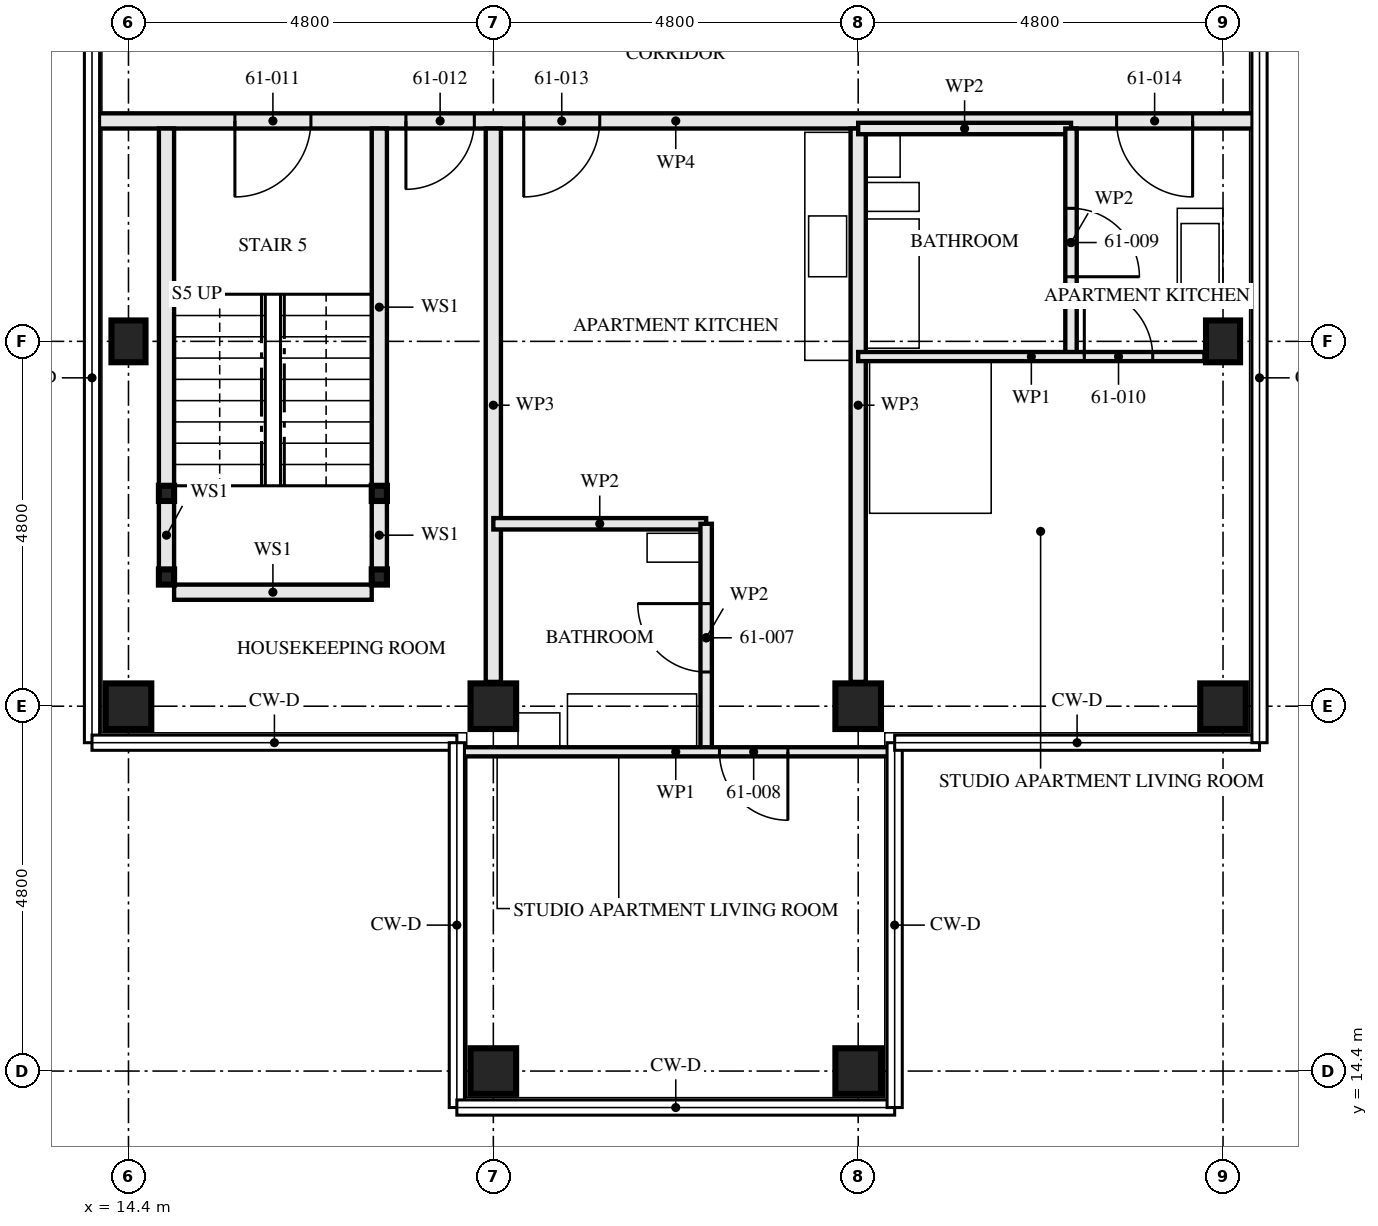
"""IFC4 building model, lengths in metres.
Left out: names, types, materials, properties, quantities, classifications, styles, units other than length and angle.
Written with IfcOpenShell. Run it as: python <this file> out.ifc"""

import sys

from ifc_helpers import new_model, si_unit, direction, frame, frame_2d, origin, origin_2d, place, context, subcontext, project, spatial, rectangle, hollow_rectangle, i_section, extrude, element, fill, save


model = new_model("IFC4")
c1 = context("Model", 3, precision=1e-05, world=origin(), true_north=direction((0.0, 1.0)))
c2 = subcontext(c1, "Body", "Model", "MODEL_VIEW")
j1 = project(units=[si_unit("LENGTHUNIT", "METRE"), si_unit("PLANEANGLEUNIT", "RADIAN")], contexts=[c1])
p1 = place(None, origin())
s1 = spatial("IfcSite", under=j1, at=p1, CompositionType="ELEMENT")
p2 = place(p1, origin())
s2 = spatial("IfcBuilding", under=s1, at=p2, CompositionType="ELEMENT")
p3 = place(p2, frame((0.0, 0.0, 222.5)))
s3 = spatial("IfcBuildingStorey", under=s2, at=p3, CompositionType="ELEMENT", Elevation=222.5)
p4 = place(p3, frame((14.4, 19.2, 0.0), z_axis=(0.0, 0.0, 1.0), x_axis=(0.0, 1.0, 0.0)))
e1 = element("IfcColumn", 1, at=p4, inside=s3, PredefinedType="COLUMN", context=c2, shape_type="SweptSolid", body=[
    extrude(hollow_rectangle(XDim=0.6, YDim=0.6, WallThickness=0.05, at=origin_2d()), origin(), (0.0, 0.0, 1.0), 3.5),
])
p5 = place(p3, frame((14.4, 24.0, 0.0), z_axis=(0.0, 0.0, 1.0), x_axis=(1.0, 0.0, 0.0)))
e2 = element("IfcColumn", 2, at=p5, inside=s3, PredefinedType="COLUMN", context=c2, shape_type="SweptSolid", body=[
    extrude(i_section(OverallWidth=0.448, OverallDepth=0.55, WebThickness=0.072, FlangeThickness=0.115, FilletRadius=0.015, at=origin_2d()), origin(), (0.0, 0.0, 1.0), 3.5),
])
for number, where, z_axis, x_axis in (
    (3, (19.2, 14.4, 0.0), (0.0, 0.0, 1.0), (0.0, 1.0, 0.0)),
    (4, (19.2, 19.2, 0.0), (0.0, 0.0, 1.0), (0.0, 1.0, 0.0)),
    (5, (24.0, 14.4, 0.0), (0.0, 0.0, 1.0), (0.0, 1.0, 0.0)),
    (6, (24.0, 19.2, 0.0), (0.0, 0.0, 1.0), (0.0, 1.0, 0.0)),
    (7, (28.8, 19.2, 0.0), (0.0, 0.0, 1.0), (0.0, 1.0, 0.0)),
):
    element("IfcColumn", number, at=place(p3, frame(where, z_axis=z_axis, x_axis=x_axis)), inside=s3, PredefinedType="COLUMN", context=c2, shape_type="SweptSolid", body=[
        extrude(hollow_rectangle(XDim=0.6, YDim=0.6, WallThickness=0.05, at=origin_2d()), origin(), (0.0, 0.0, 1.0), 3.5),
    ])
p6 = place(p3, frame((28.8, 24.0, 0.0), z_axis=(0.0, 0.0, 1.0), x_axis=(1.0, 0.0, 0.0)))
e8 = element("IfcColumn", 8, at=p6, inside=s3, PredefinedType="COLUMN", context=c2, shape_type="SweptSolid", body=[
    extrude(i_section(OverallWidth=0.448, OverallDepth=0.55, WebThickness=0.072, FlangeThickness=0.115, FilletRadius=0.015, at=origin_2d()), origin(), (0.0, 0.0, 1.0), 3.5),
])
for number, where, z_axis, x_axis in (
    (9, (14.9, 20.9, 0.0), (0.0, 0.0, 1.0), (1.0, 0.0, 0.0)),
    (10, (17.7, 20.9, 0.0), (0.0, 0.0, 1.0), (1.0, 0.0, 0.0)),
    (11, (14.9, 22.0, 0.0), (0.0, 0.0, 1.0), (1.0, 0.0, 0.0)),
    (12, (17.7, 22.0, 0.0), (0.0, 0.0, 1.0), (1.0, 0.0, 0.0)),
):
    element("IfcColumn", number, at=place(p3, frame(where, z_axis=z_axis, x_axis=x_axis)), inside=s3, PredefinedType="COLUMN", context=c2, shape_type="SweptSolid", body=[
        extrude(hollow_rectangle(XDim=0.2, YDim=0.2, WallThickness=0.008, at=origin_2d()), origin(), (0.0, 0.0, 1.0), 3.33),
    ])
p7 = place(p3, frame((14.9, 21.0, 0.0), z_axis=(0.0, 0.0, 1.0), x_axis=(0.0, 1.0, 0.0)))
e13 = element("IfcWall", 13, at=p7, inside=s3, PredefinedType="SOLIDWALL", context=c2, shape_type="SweptSolid", body=[
    extrude(rectangle(XDim=0.9, YDim=0.2, at=frame_2d((0.45, 0.0))), origin(), (0.0, 0.0, 1.0), 2.99),
])
p8 = place(p3, frame((14.9, 22.1, 0.0), z_axis=(0.0, 0.0, 1.0), x_axis=(0.0, 1.0, 0.0)))
e14 = element("IfcWall", 14, at=p8, inside=s3, PredefinedType="SOLIDWALL", context=c2, shape_type="SweptSolid", body=[
    extrude(rectangle(XDim=4.7, YDim=0.2, at=frame_2d((2.35, 0.0))), origin(), (0.0, 0.0, 1.0), 2.99),
])
p9 = place(p3, frame((17.7, 21.0, 0.0), z_axis=(0.0, 0.0, 1.0), x_axis=(0.0, 1.0, 0.0)))
e15 = element("IfcWall", 15, at=p9, inside=s3, PredefinedType="SOLIDWALL", context=c2, shape_type="SweptSolid", body=[
    extrude(rectangle(XDim=0.9, YDim=0.2, at=frame_2d((0.45, 0.0))), origin(), (0.0, 0.0, 1.0), 2.99),
])
p10 = place(p3, frame((17.7, 22.1, 0.0), z_axis=(0.0, 0.0, 1.0), x_axis=(0.0, 1.0, 0.0)))
e16 = element("IfcWall", 16, at=p10, inside=s3, PredefinedType="SOLIDWALL", context=c2, shape_type="SweptSolid", body=[
    extrude(rectangle(XDim=4.7, YDim=0.2, at=frame_2d((2.35, 0.0))), origin(), (0.0, 0.0, 1.0), 2.99),
])
p11 = place(p3, frame((15.0, 20.7, 0.0), z_axis=(0.0, 0.0, 1.0), x_axis=(1.0, 0.0, 0.0)))
e17 = element("IfcWall", 17, at=p11, inside=s3, PredefinedType="SOLIDWALL", context=c2, shape_type="SweptSolid", body=[
    extrude(rectangle(XDim=2.6, YDim=0.2, at=frame_2d((1.3, 0.0))), origin(), (0.0, 0.0, 1.0), 3.33),
])
p12 = place(p3, frame((19.2, 19.52, 0.0), z_axis=(0.0, 0.0, 1.0), x_axis=(0.0, 1.0, 0.0)))
e18 = element("IfcWall", 18, at=p12, inside=s3, PredefinedType="PARTITIONING", context=c2, shape_type="SweptSolid", body=[
    extrude(rectangle(XDim=7.28, YDim=0.2, at=frame_2d((3.64, 0.0))), origin(), (0.0, 0.0, 1.0), 2.55),
])
p13 = place(p3, frame((22.0, 18.6, 0.0), z_axis=(0.0, 0.0, 1.0), x_axis=(0.0, 1.0, 0.0)))
e19 = element("IfcWall", 19, at=p13, inside=s3, PredefinedType="PARTITIONING", context=c2, shape_type="SweptSolid", body=[
    extrude(rectangle(XDim=3.0, YDim=0.15, at=frame_2d((1.5, 0.0))), origin(), (0.0, 0.0, 1.0), 2.55),
])
p14 = place(p13, frame((1.05, 0.0, 0.0)))
e20 = element("IfcOpeningElement", 20, at=p14, cuts=e19, PredefinedType="OPENING", context=c2, shape_type="SweptSolid", body=[
    extrude(rectangle(XDim=0.9, YDim=2.1, at=frame_2d((0.45, 1.05))), frame((0.0, 0.085, 0.0), z_axis=(0.0, -1.0, 0.0), x_axis=(1.0, 0.0, 0.0)), (0.0, 0.0, 1.0), 0.171),
])
p15 = place(p3, frame((19.2, 21.6, 0.0), z_axis=(0.0, 0.0, 1.0), x_axis=(1.0, 0.0, 0.0)))
e21 = element("IfcWall", 21, at=p15, inside=s3, PredefinedType="PARTITIONING", context=c2, shape_type="SweptSolid", body=[
    extrude(rectangle(XDim=2.8, YDim=0.15, at=frame_2d((1.4, 0.0))), origin(), (0.0, 0.0, 1.0), 3.33),
])
p16 = place(p3, frame((18.745, 18.6, 0.0), z_axis=(0.0, 0.0, 1.0), x_axis=(1.0, 0.0, 0.0)))
e22 = element("IfcWall", 22, at=p16, inside=s3, PredefinedType="PARTITIONING", context=c2, shape_type="SweptSolid", body=[
    extrude(rectangle(XDim=5.71, YDim=0.12, at=frame_2d((2.855, 0.0))), origin(), (0.0, 0.0, 1.0), 2.32),
])
p17 = place(p16, frame((3.43, 0.0, 0.0)))
e23 = element("IfcOpeningElement", 23, at=p17, cuts=e22, PredefinedType="OPENING", context=c2, shape_type="SweptSolid", body=[
    extrude(rectangle(XDim=0.9, YDim=2.1, at=frame_2d((0.45, 1.05))), frame((0.0, 0.071, 0.0), z_axis=(0.0, -1.0, 0.0), x_axis=(1.0, 0.0, 0.0)), (0.0, 0.0, 1.0), 0.141),
])
p18 = place(p3, frame((24.0, 19.52, 0.0), z_axis=(0.0, 0.0, 1.0), x_axis=(0.0, 1.0, 0.0)))
e24 = element("IfcWall", 24, at=p18, inside=s3, PredefinedType="PARTITIONING", context=c2, shape_type="SweptSolid", body=[
    extrude(rectangle(XDim=7.28, YDim=0.2, at=frame_2d((3.64, 0.0))), origin(), (0.0, 0.0, 1.0), 2.55),
])
p19 = place(p3, frame((26.8, 23.8, 0.0), z_axis=(0.0, 0.0, 1.0), x_axis=(0.0, 1.0, 0.0)))
e25 = element("IfcWall", 25, at=p19, inside=s3, PredefinedType="PARTITIONING", context=c2, shape_type="SweptSolid", body=[
    extrude(rectangle(XDim=3.0, YDim=0.15, at=frame_2d((1.5, 0.0))), origin(), (0.0, 0.0, 1.0), 2.55),
])
p20 = place(p19, frame((1.05, 0.0, 0.0)))
e26 = element("IfcOpeningElement", 26, at=p20, cuts=e25, PredefinedType="OPENING", context=c2, shape_type="SweptSolid", body=[
    extrude(rectangle(XDim=0.9, YDim=2.1, at=frame_2d((0.45, 1.05))), frame((0.0, 0.085, 0.0), z_axis=(0.0, -1.0, 0.0), x_axis=(1.0, 0.0, 0.0)), (0.0, 0.0, 1.0), 0.171),
])
p21 = place(p3, frame((24.0, 26.8, 0.0), z_axis=(0.0, 0.0, 1.0), x_axis=(1.0, 0.0, 0.0)))
e27 = element("IfcWall", 27, at=p21, inside=s3, PredefinedType="PARTITIONING", context=c2, shape_type="SweptSolid", body=[
    extrude(rectangle(XDim=2.8, YDim=0.15, at=frame_2d((1.4, 0.0))), origin(), (0.0, 0.0, 1.0), 3.33),
])
p22 = place(p3, frame((24.0, 23.8, 0.0), z_axis=(0.0, 0.0, 1.0), x_axis=(1.0, 0.0, 0.0)))
e28 = element("IfcWall", 28, at=p22, inside=s3, PredefinedType="PARTITIONING", context=c2, shape_type="SweptSolid", body=[
    extrude(rectangle(XDim=4.556, YDim=0.12, at=frame_2d((2.278, 0.0))), origin(), (0.0, 0.0, 1.0), 3.33),
])
p23 = place(p22, frame((2.975, 0.0, 0.0)))
e29 = element("IfcOpeningElement", 29, at=p23, cuts=e28, PredefinedType="OPENING", context=c2, shape_type="SweptSolid", body=[
    extrude(rectangle(XDim=0.9, YDim=2.1, at=frame_2d((0.45, 1.05))), frame((0.0, 0.071, 0.0), z_axis=(0.0, -1.0, 0.0), x_axis=(1.0, 0.0, 0.0)), (0.0, 0.0, 1.0), 0.141),
])
p24 = place(p3, frame((13.945, 26.9, 0.0), z_axis=(0.0, 0.0, 1.0), x_axis=(1.0, 0.0, 0.0)))
e30 = element("IfcWall", 30, at=p24, inside=s3, PredefinedType="PARTITIONING", context=c2, shape_type="SweptSolid", body=[
    extrude(rectangle(XDim=15.31, YDim=0.2, at=frame_2d((7.655, 0.0))), origin(), (0.0, 0.0, 1.0), 2.32),
])
p25 = place(p24, frame((1.855, 0.0, 0.0)))
e31 = element("IfcOpeningElement", 31, at=p25, cuts=e30, PredefinedType="OPENING", context=c2, shape_type="SweptSolid", body=[
    extrude(rectangle(XDim=1.0, YDim=2.1, at=frame_2d((0.5, 1.05))), frame((0.0, 0.111, 0.0), z_axis=(0.0, -1.0, 0.0), x_axis=(1.0, 0.0, 0.0)), (0.0, 0.0, 1.0), 0.221),
])
p26 = place(p24, frame((4.105, 0.0, 0.0)))
e32 = element("IfcOpeningElement", 32, at=p26, cuts=e30, PredefinedType="OPENING", context=c2, shape_type="SweptSolid", body=[
    extrude(rectangle(XDim=0.9, YDim=2.1, at=frame_2d((0.45, 1.05))), frame((0.0, 0.111, 0.0), z_axis=(0.0, -1.0, 0.0), x_axis=(1.0, 0.0, 0.0)), (0.0, 0.0, 1.0), 0.221),
])
p27 = place(p24, frame((5.655, 0.0, 0.0)))
e33 = element("IfcOpeningElement", 33, at=p27, cuts=e30, PredefinedType="OPENING", context=c2, shape_type="SweptSolid", body=[
    extrude(rectangle(XDim=1.0, YDim=2.1, at=frame_2d((0.5, 1.05))), frame((0.0, 0.111, 0.0), z_axis=(0.0, -1.0, 0.0), x_axis=(1.0, 0.0, 0.0)), (0.0, 0.0, 1.0), 0.221),
])
p28 = place(p24, frame((13.455, 0.0, 0.0)))
e34 = element("IfcOpeningElement", 34, at=p28, cuts=e30, PredefinedType="OPENING", context=c2, shape_type="SweptSolid", body=[
    extrude(rectangle(XDim=1.0, YDim=2.1, at=frame_2d((0.5, 1.05))), frame((0.0, 0.111, 0.0), z_axis=(0.0, -1.0, 0.0), x_axis=(1.0, 0.0, 0.0)), (0.0, 0.0, 1.0), 0.221),
])
p29 = place(p14, origin())
e35 = element("IfcDoor", 35, at=p29, inside=s3, OperationType="SINGLE_SWING_LEFT", PredefinedType="DOOR", context=c2, shape_type="SweptSolid", body=[
    extrude(rectangle(XDim=0.9, YDim=2.1, at=frame_2d((0.45, 1.05))), frame((0.0, 0.022, 0.0), z_axis=(0.0, -1.0, 0.0), x_axis=(1.0, 0.0, 0.0)), (0.0, 0.0, 1.0), 0.044),
])
fill(e20, e35)
p30 = place(p17, frame((0.9, 0.0, 0.0), z_axis=(0.0, 0.0, 1.0), x_axis=(-1.0, 0.0, 0.0)))
e36 = element("IfcDoor", 36, at=p30, inside=s3, OperationType="SINGLE_SWING_RIGHT", PredefinedType="DOOR", context=c2, shape_type="SweptSolid", body=[
    extrude(rectangle(XDim=0.9, YDim=2.1, at=frame_2d((0.45, 1.05))), frame((0.0, 0.022, 0.0), z_axis=(0.0, -1.0, 0.0), x_axis=(1.0, 0.0, 0.0)), (0.0, 0.0, 1.0), 0.044),
])
fill(e23, e36)
p31 = place(p20, frame((0.9, 0.0, 0.0), z_axis=(0.0, 0.0, 1.0), x_axis=(-1.0, 0.0, 0.0)))
e37 = element("IfcDoor", 37, at=p31, inside=s3, OperationType="SINGLE_SWING_LEFT", PredefinedType="DOOR", context=c2, shape_type="SweptSolid", body=[
    extrude(rectangle(XDim=0.9, YDim=2.1, at=frame_2d((0.45, 1.05))), frame((0.0, 0.022, 0.0), z_axis=(0.0, -1.0, 0.0), x_axis=(1.0, 0.0, 0.0)), (0.0, 0.0, 1.0), 0.044),
])
fill(e26, e37)
p32 = place(p23, origin())
e38 = element("IfcDoor", 38, at=p32, inside=s3, OperationType="SINGLE_SWING_RIGHT", PredefinedType="DOOR", context=c2, shape_type="SweptSolid", body=[
    extrude(rectangle(XDim=0.9, YDim=2.1, at=frame_2d((0.45, 1.05))), frame((0.0, 0.022, 0.0), z_axis=(0.0, -1.0, 0.0), x_axis=(1.0, 0.0, 0.0)), (0.0, 0.0, 1.0), 0.044),
])
fill(e29, e38)
p33 = place(p25, frame((1.0, 0.0, 0.0), z_axis=(0.0, 0.0, 1.0), x_axis=(-1.0, 0.0, 0.0)))
e39 = element("IfcDoor", 39, at=p33, inside=s3, OperationType="SINGLE_SWING_LEFT", PredefinedType="DOOR", context=c2, shape_type="SweptSolid", body=[
    extrude(rectangle(XDim=1.0, YDim=2.1, at=frame_2d((0.5, 1.05))), frame((0.0, 0.032, 0.0), z_axis=(0.0, -1.0, 0.0), x_axis=(1.0, 0.0, 0.0)), (0.0, 0.0, 1.0), 0.064),
])
fill(e31, e39)
p34 = place(p26, frame((0.9, 0.0, 0.0), z_axis=(0.0, 0.0, 1.0), x_axis=(-1.0, 0.0, 0.0)))
e40 = element("IfcDoor", 40, at=p34, inside=s3, OperationType="SINGLE_SWING_LEFT", PredefinedType="DOOR", context=c2, shape_type="SweptSolid", body=[
    extrude(rectangle(XDim=0.9, YDim=2.1, at=frame_2d((0.45, 1.05))), frame((0.0, 0.027, 0.0), z_axis=(0.0, -1.0, 0.0), x_axis=(1.0, 0.0, 0.0)), (0.0, 0.0, 1.0), 0.054),
])
fill(e32, e40)
p35 = place(p27, frame((1.0, 0.0, 0.0), z_axis=(0.0, 0.0, 1.0), x_axis=(-1.0, 0.0, 0.0)))
e41 = element("IfcDoor", 41, at=p35, inside=s3, OperationType="SINGLE_SWING_LEFT", PredefinedType="DOOR", context=c2, shape_type="SweptSolid", body=[
    extrude(rectangle(XDim=1.0, YDim=2.1, at=frame_2d((0.5, 1.05))), frame((0.0, 0.027, 0.0), z_axis=(0.0, -1.0, 0.0), x_axis=(1.0, 0.0, 0.0)), (0.0, 0.0, 1.0), 0.054),
])
fill(e33, e41)
p36 = place(p28, frame((1.0, 0.0, 0.0), z_axis=(0.0, 0.0, 1.0), x_axis=(-1.0, 0.0, 0.0)))
e42 = element("IfcDoor", 42, at=p36, inside=s3, OperationType="SINGLE_SWING_RIGHT", PredefinedType="DOOR", context=c2, shape_type="SweptSolid", body=[
    extrude(rectangle(XDim=1.0, YDim=2.1, at=frame_2d((0.5, 1.05))), frame((0.0, 0.027, 0.0), z_axis=(0.0, -1.0, 0.0), x_axis=(1.0, 0.0, 0.0)), (0.0, 0.0, 1.0), 0.054),
])
fill(e34, e42)
save(model, sys.argv[1])
